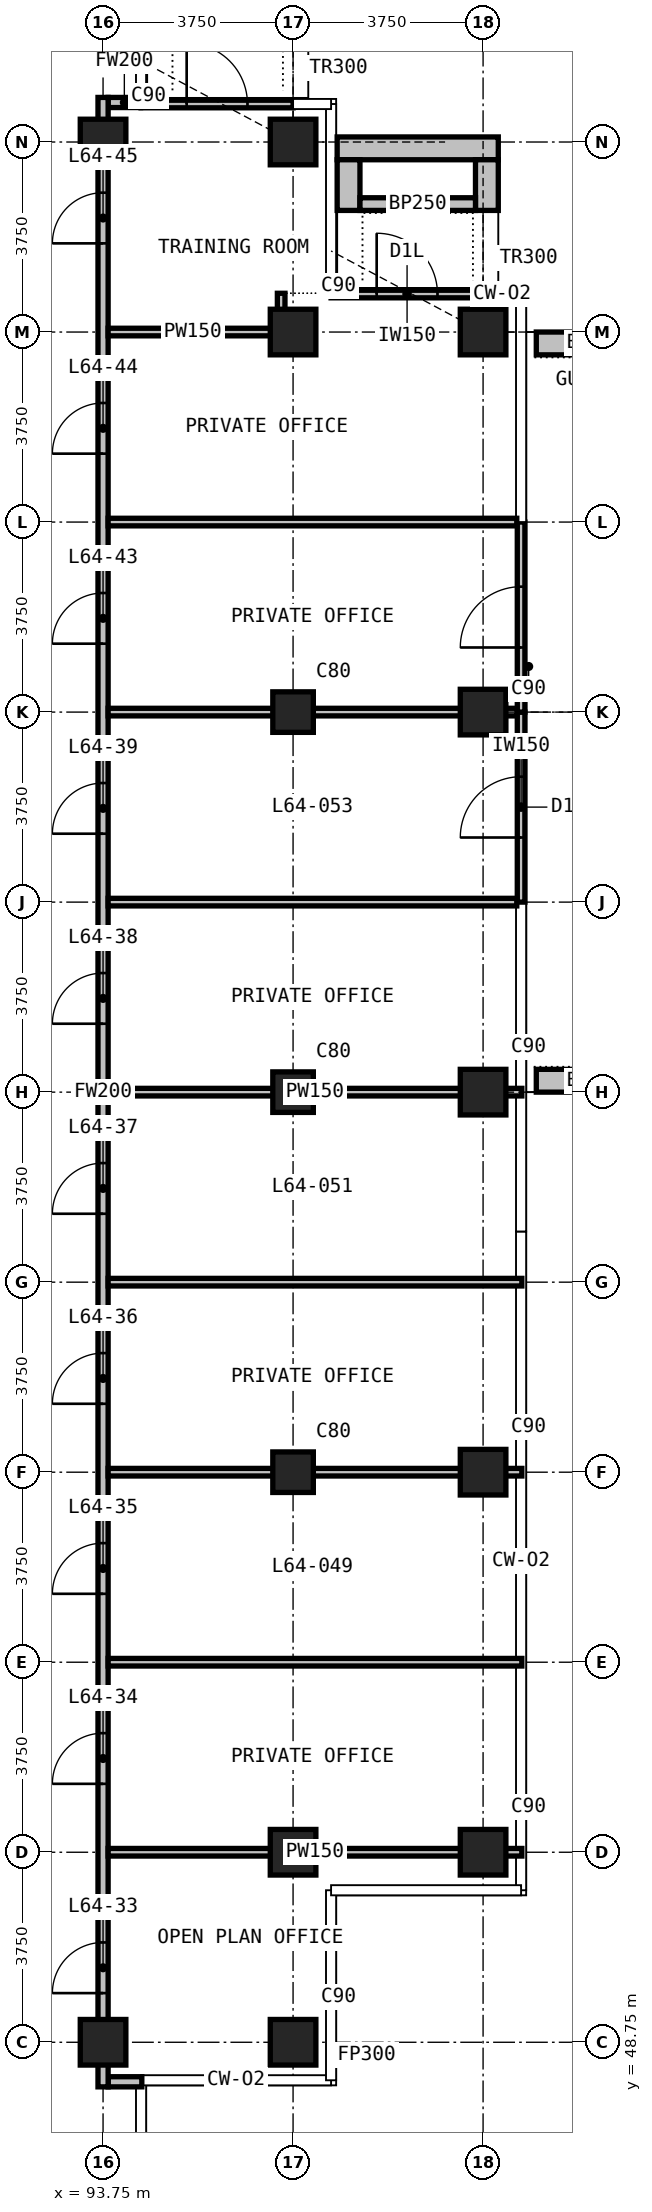
"""IFC4 building model, lengths in metres.
Left out: names, types, materials, properties, quantities, classifications, styles, units other than length and angle.
Written with IfcOpenShell. Run it as: python <this file> out.ifc"""

import sys

from ifc_helpers import new_model, si_unit, direction, frame, frame_2d, origin, origin_2d, place, context, subcontext, project, spatial, rectangle, extrude, element, fill, save


model = new_model("IFC4")
c1 = context("Model", 3, precision=1e-05, world=origin(), true_north=direction((0.0, 1.0)))
c2 = subcontext(c1, "Body", "Model", "MODEL_VIEW")
j1 = project(units=[si_unit("LENGTHUNIT", "METRE"), si_unit("PLANEANGLEUNIT", "RADIAN")], contexts=[c1])
p1 = place(None, origin())
s1 = spatial("IfcSite", under=j1, at=p1, CompositionType="ELEMENT")
p2 = place(p1, origin())
s2 = spatial("IfcBuilding", under=s1, at=p2, CompositionType="ELEMENT")
p3 = place(p2, frame((0.0, 0.0, 246.3)))
s3 = spatial("IfcBuildingStorey", under=s2, at=p3, CompositionType="ELEMENT", Elevation=246.3)
for number, where, z_axis, x_axis in (
    (1, (93.75, 48.75, 0.0), (0.0, 0.0, 1.0), (1.0, 0.0, 0.0)),
    (2, (93.75, 86.25, 0.0), (0.0, 0.0, 1.0), (1.0, 0.0, 0.0)),
    (3, (97.5, 48.75, 0.0), (0.0, 0.0, 1.0), (1.0, 0.0, 0.0)),
    (4, (97.5, 52.5, 0.0), (0.0, 0.0, 1.0), (1.0, 0.0, 0.0)),
):
    element("IfcColumn", number, at=place(p3, frame(where, z_axis=z_axis, x_axis=x_axis)), inside=s3, PredefinedType="COLUMN", context=c2, shape_type="SweptSolid", body=[
        extrude(rectangle(XDim=0.9, YDim=0.9, at=origin_2d()), origin(), (0.0, 0.0, 1.0), 3.6),
    ])
for number, where, z_axis, x_axis in (
    (5, (97.5, 60.0, 0.0), (0.0, 0.0, 1.0), (1.0, 0.0, 0.0)),
    (6, (97.5, 67.5, 0.0), (0.0, 0.0, 1.0), (1.0, 0.0, 0.0)),
    (7, (97.5, 75.0, 0.0), (0.0, 0.0, 1.0), (1.0, 0.0, 0.0)),
):
    element("IfcColumn", number, at=place(p3, frame(where, z_axis=z_axis, x_axis=x_axis)), inside=s3, PredefinedType="COLUMN", context=c2, shape_type="SweptSolid", body=[
        extrude(rectangle(XDim=0.8, YDim=0.8, at=origin_2d()), origin(), (0.0, 0.0, 1.0), 3.6),
    ])
for number, where, z_axis, x_axis in (
    (8, (97.5, 82.5, 0.0), (0.0, 0.0, 1.0), (1.0, 0.0, 0.0)),
    (9, (97.5, 86.25, 0.0), (0.0, 0.0, 1.0), (1.0, 0.0, 0.0)),
    (10, (101.25, 52.5, 0.0), (0.0, 0.0, 1.0), (1.0, 0.0, 0.0)),
    (11, (101.25, 60.0, 0.0), (0.0, 0.0, 1.0), (1.0, 0.0, 0.0)),
    (12, (101.25, 67.5, 0.0), (0.0, 0.0, 1.0), (1.0, 0.0, 0.0)),
    (13, (101.25, 75.0, 0.0), (0.0, 0.0, 1.0), (1.0, 0.0, 0.0)),
    (14, (101.25, 82.5, 0.0), (0.0, 0.0, 1.0), (1.0, 0.0, 0.0)),
):
    element("IfcColumn", number, at=place(p3, frame(where, z_axis=z_axis, x_axis=x_axis)), inside=s3, PredefinedType="COLUMN", context=c2, shape_type="SweptSolid", body=[
        extrude(rectangle(XDim=0.9, YDim=0.9, at=origin_2d()), origin(), (0.0, 0.0, 1.0), 3.6),
    ])
p4 = place(p3, frame((102.0, 71.25, 0.0), z_axis=(0.0, 0.0, 1.0), x_axis=(0.0, 1.0, 0.0)))
e15 = element("IfcWall", 15, at=p4, inside=s3, PredefinedType="SOLIDWALL", context=c2, shape_type="SweptSolid", body=[
    extrude(rectangle(XDim=3.75, YDim=0.15, at=frame_2d((1.875, 0.0))), origin(), (0.0, 0.0, 1.0), 3.3),
])
p5 = place(p4, frame((1.275, 0.0, 0.0)))
e16 = element("IfcOpeningElement", 16, at=p5, cuts=e15, PredefinedType="OPENING", context=c2, shape_type="SweptSolid", body=[
    extrude(rectangle(XDim=1.2, YDim=2.4, at=frame_2d((0.6, 1.2))), frame((0.0, 0.085, 0.0), z_axis=(0.0, -1.0, 0.0), x_axis=(1.0, 0.0, 0.0)), (0.0, 0.0, 1.0), 0.17),
])
p6 = place(p3, frame((102.0, 75.0, 0.0), z_axis=(0.0, 0.0, 1.0), x_axis=(0.0, 1.0, 0.0)))
e17 = element("IfcWall", 17, at=p6, inside=s3, PredefinedType="SOLIDWALL", context=c2, shape_type="SweptSolid", body=[
    extrude(rectangle(XDim=3.75, YDim=0.15, at=frame_2d((1.875, 0.0))), origin(), (0.0, 0.0, 1.0), 3.3),
])
p7 = place(p6, frame((1.275, 0.0, 0.0)))
e18 = element("IfcOpeningElement", 18, at=p7, cuts=e17, PredefinedType="OPENING", context=c2, shape_type="SweptSolid", body=[
    extrude(rectangle(XDim=1.2, YDim=2.4, at=frame_2d((0.6, 1.2))), frame((0.0, 0.085, 0.0), z_axis=(0.0, -1.0, 0.0), x_axis=(1.0, 0.0, 0.0)), (0.0, 0.0, 1.0), 0.17),
])
p8 = place(p3, frame((98.25, 83.25, 0.0), z_axis=(0.0, 0.0, 1.0), x_axis=(1.0, 0.0, 0.0)))
e19 = element("IfcWall", 19, at=p8, inside=s3, PredefinedType="SOLIDWALL", context=c2, shape_type="SweptSolid", body=[
    extrude(rectangle(XDim=3.0, YDim=0.15, at=frame_2d((1.5, 0.0))), origin(), (0.0, 0.0, 1.0), 3.3),
])
p9 = place(p8, frame((0.9, 0.0, 0.0)))
e20 = element("IfcOpeningElement", 20, at=p9, cuts=e19, PredefinedType="OPENING", context=c2, shape_type="SweptSolid", body=[
    extrude(rectangle(XDim=1.2, YDim=2.0, at=frame_2d((0.6, 1.0))), frame((0.0, 0.085, 0.0), z_axis=(0.0, -1.0, 0.0), x_axis=(1.0, 0.0, 0.0)), (0.0, 0.0, 1.0), 0.17),
])
p10 = place(p3, frame((94.5, 87.0, 0.0), z_axis=(0.0, 0.0, 1.0), x_axis=(1.0, 0.0, 0.0)))
e21 = element("IfcWall", 21, at=p10, inside=s3, PredefinedType="SOLIDWALL", context=c2, shape_type="SweptSolid", body=[
    extrude(rectangle(XDim=3.0, YDim=0.15, at=frame_2d((1.5, 0.0))), origin(), (0.0, 0.0, 1.0), 3.3),
])
p11 = place(p10, frame((0.9, 0.0, 0.0)))
e22 = element("IfcOpeningElement", 22, at=p11, cuts=e21, PredefinedType="OPENING", context=c2, shape_type="SweptSolid", body=[
    extrude(rectangle(XDim=1.2, YDim=2.0, at=frame_2d((0.6, 1.0))), frame((0.0, 0.085, 0.0), z_axis=(0.0, -1.0, 0.0), x_axis=(1.0, 0.0, 0.0)), (0.0, 0.0, 1.0), 0.17),
])
for number, where, z_axis, x_axis in (
    (23, (102.3, 67.725, 0.0), (0.0, 0.0, 1.0), (1.0, 0.0, 0.0)),
    (24, (102.3, 82.275, 0.0), (0.0, 0.0, 1.0), (1.0, 0.0, 0.0)),
):
    element("IfcWall", number, at=place(p3, frame(where, z_axis=z_axis, x_axis=x_axis)), inside=s3, PredefinedType="USERDEFINED", context=c2, shape_type="SweptSolid", body=[
        extrude(rectangle(XDim=2.35, YDim=0.45, at=frame_2d((1.175, 0.0))), origin(), (0.0, 0.0, 1.0), 1.1),
    ])
p12 = place(p3, frame((98.37, 86.125, 0.0), z_axis=(0.0, 0.0, 1.0), x_axis=(1.0, 0.0, 0.0)))
e25 = element("IfcWall", 25, at=p12, inside=s3, PredefinedType="USERDEFINED", context=c2, shape_type="SweptSolid", body=[
    extrude(rectangle(XDim=3.18, YDim=0.45, at=frame_2d((1.59, 0.0))), origin(), (0.0, 0.0, 1.0), 1.1),
])
for number, where, z_axis, x_axis in (
    (26, (98.595, 84.9, 0.0), (0.0, 0.0, 1.0), (0.0, 1.0, 0.0)),
    (27, (101.325, 84.9, 0.0), (0.0, 0.0, 1.0), (0.0, 1.0, 0.0)),
):
    element("IfcWall", number, at=place(p3, frame(where, z_axis=z_axis, x_axis=x_axis)), inside=s3, PredefinedType="USERDEFINED", context=c2, shape_type="SweptSolid", body=[
        extrude(rectangle(XDim=1.0, YDim=0.45, at=frame_2d((0.5, 0.0))), origin(), (0.0, 0.0, 1.0), 1.1),
    ])
p13 = place(p3, frame((98.82, 85.025, 0.0), z_axis=(0.0, 0.0, 1.0), x_axis=(1.0, 0.0, 0.0)))
e28 = element("IfcWall", 28, at=p13, inside=s3, PredefinedType="USERDEFINED", context=c2, shape_type="SweptSolid", body=[
    extrude(rectangle(XDim=2.28, YDim=0.25, at=frame_2d((1.14, 0.0))), origin(), (0.0, 0.0, 1.0), 1.0),
])
p14 = place(p3, frame((93.85, 47.97, 0.0), z_axis=(0.0, 0.0, 1.0), x_axis=(1.0, 0.0, 0.0)))
e29 = element("IfcWall", 29, at=p14, inside=s3, PredefinedType="PARTITIONING", context=c2, shape_type="SweptSolid", body=[
    extrude(rectangle(XDim=0.665, YDim=0.2, at=frame_2d((0.333, 0.0))), origin(), (0.0, 0.0, 1.0), 3.3),
])
p15 = place(p3, frame((93.85, 87.03, 0.0), z_axis=(0.0, 0.0, 1.0), x_axis=(1.0, 0.0, 0.0)))
e30 = element("IfcWall", 30, at=p15, inside=s3, PredefinedType="PARTITIONING", context=c2, shape_type="SweptSolid", body=[
    extrude(rectangle(XDim=0.64, YDim=0.2, at=frame_2d((0.32, 0.0))), origin(), (0.0, 0.0, 1.0), 3.3),
])
p16 = place(p3, frame((93.75, 47.87, 0.0), z_axis=(0.0, 0.0, 1.0), x_axis=(0.0, 1.0, 0.0)))
e31 = element("IfcWall", 31, at=p16, inside=s3, PredefinedType="PARTITIONING", context=c2, shape_type="SweptSolid", body=[
    extrude(rectangle(XDim=39.26, YDim=0.2, at=frame_2d((19.63, 0.0))), origin(), (0.0, 0.0, 1.0), 3.3),
])
p17 = place(p16, frame((1.85, 0.0, 0.0)))
e32 = element("IfcOpeningElement", 32, at=p17, cuts=e31, PredefinedType="OPENING", context=c2, shape_type="SweptSolid", body=[
    extrude(rectangle(XDim=1.0, YDim=2.2, at=frame_2d((0.5, 1.1))), frame((0.0, 0.11, 0.0), z_axis=(0.0, -1.0, 0.0), x_axis=(1.0, 0.0, 0.0)), (0.0, 0.0, 1.0), 0.22),
])
p18 = place(p16, frame((5.98, 0.0, 0.0)))
e33 = element("IfcOpeningElement", 33, at=p18, cuts=e31, PredefinedType="OPENING", context=c2, shape_type="SweptSolid", body=[
    extrude(rectangle(XDim=1.0, YDim=2.2, at=frame_2d((0.5, 1.1))), frame((0.0, 0.11, 0.0), z_axis=(0.0, -1.0, 0.0), x_axis=(1.0, 0.0, 0.0)), (0.0, 0.0, 1.0), 0.22),
])
p19 = place(p16, frame((9.73, 0.0, 0.0)))
e34 = element("IfcOpeningElement", 34, at=p19, cuts=e31, PredefinedType="OPENING", context=c2, shape_type="SweptSolid", body=[
    extrude(rectangle(XDim=1.0, YDim=2.2, at=frame_2d((0.5, 1.1))), frame((0.0, 0.11, 0.0), z_axis=(0.0, -1.0, 0.0), x_axis=(1.0, 0.0, 0.0)), (0.0, 0.0, 1.0), 0.22),
])
p20 = place(p16, frame((13.48, 0.0, 0.0)))
e35 = element("IfcOpeningElement", 35, at=p20, cuts=e31, PredefinedType="OPENING", context=c2, shape_type="SweptSolid", body=[
    extrude(rectangle(XDim=1.0, YDim=2.2, at=frame_2d((0.5, 1.1))), frame((0.0, 0.11, 0.0), z_axis=(0.0, -1.0, 0.0), x_axis=(1.0, 0.0, 0.0)), (0.0, 0.0, 1.0), 0.22),
])
p21 = place(p16, frame((17.23, 0.0, 0.0)))
e36 = element("IfcOpeningElement", 36, at=p21, cuts=e31, PredefinedType="OPENING", context=c2, shape_type="SweptSolid", body=[
    extrude(rectangle(XDim=1.0, YDim=2.2, at=frame_2d((0.5, 1.1))), frame((0.0, 0.11, 0.0), z_axis=(0.0, -1.0, 0.0), x_axis=(1.0, 0.0, 0.0)), (0.0, 0.0, 1.0), 0.22),
])
p22 = place(p16, frame((20.98, 0.0, 0.0)))
e37 = element("IfcOpeningElement", 37, at=p22, cuts=e31, PredefinedType="OPENING", context=c2, shape_type="SweptSolid", body=[
    extrude(rectangle(XDim=1.0, YDim=2.2, at=frame_2d((0.5, 1.1))), frame((0.0, 0.11, 0.0), z_axis=(0.0, -1.0, 0.0), x_axis=(1.0, 0.0, 0.0)), (0.0, 0.0, 1.0), 0.22),
])
p23 = place(p16, frame((24.73, 0.0, 0.0)))
e38 = element("IfcOpeningElement", 38, at=p23, cuts=e31, PredefinedType="OPENING", context=c2, shape_type="SweptSolid", body=[
    extrude(rectangle(XDim=1.0, YDim=2.2, at=frame_2d((0.5, 1.1))), frame((0.0, 0.11, 0.0), z_axis=(0.0, -1.0, 0.0), x_axis=(1.0, 0.0, 0.0)), (0.0, 0.0, 1.0), 0.22),
])
p24 = place(p16, frame((28.48, 0.0, 0.0)))
e39 = element("IfcOpeningElement", 39, at=p24, cuts=e31, PredefinedType="OPENING", context=c2, shape_type="SweptSolid", body=[
    extrude(rectangle(XDim=1.0, YDim=2.2, at=frame_2d((0.5, 1.1))), frame((0.0, 0.11, 0.0), z_axis=(0.0, -1.0, 0.0), x_axis=(1.0, 0.0, 0.0)), (0.0, 0.0, 1.0), 0.22),
])
p25 = place(p16, frame((32.23, 0.0, 0.0)))
e40 = element("IfcOpeningElement", 40, at=p25, cuts=e31, PredefinedType="OPENING", context=c2, shape_type="SweptSolid", body=[
    extrude(rectangle(XDim=1.0, YDim=2.2, at=frame_2d((0.5, 1.1))), frame((0.0, 0.11, 0.0), z_axis=(0.0, -1.0, 0.0), x_axis=(1.0, 0.0, 0.0)), (0.0, 0.0, 1.0), 0.22),
])
p26 = place(p16, frame((36.38, 0.0, 0.0)))
e41 = element("IfcOpeningElement", 41, at=p26, cuts=e31, PredefinedType="OPENING", context=c2, shape_type="SweptSolid", body=[
    extrude(rectangle(XDim=1.0, YDim=2.2, at=frame_2d((0.5, 1.1))), frame((0.0, 0.11, 0.0), z_axis=(0.0, -1.0, 0.0), x_axis=(1.0, 0.0, 0.0)), (0.0, 0.0, 1.0), 0.22),
])
for number, where, z_axis, x_axis in (
    (42, (93.85, 52.5, 0.0), (0.0, 0.0, 1.0), (1.0, 0.0, 0.0)),
    (43, (93.85, 56.25, 0.0), (0.0, 0.0, 1.0), (1.0, 0.0, 0.0)),
    (44, (93.85, 60.0, 0.0), (0.0, 0.0, 1.0), (1.0, 0.0, 0.0)),
    (45, (93.85, 63.75, 0.0), (0.0, 0.0, 1.0), (1.0, 0.0, 0.0)),
    (46, (93.85, 67.5, 0.0), (0.0, 0.0, 1.0), (1.0, 0.0, 0.0)),
):
    element("IfcWall", number, at=place(p3, frame(where, z_axis=z_axis, x_axis=x_axis)), inside=s3, PredefinedType="PARTITIONING", context=c2, shape_type="SweptSolid", body=[
        extrude(rectangle(XDim=8.165, YDim=0.15, at=frame_2d((4.083, 0.0))), origin(), (0.0, 0.0, 1.0), 3.3),
    ])
for number, where, z_axis, x_axis in (
    (47, (93.85, 71.25, 0.0), (0.0, 0.0, 1.0), (1.0, 0.0, 0.0)),
    (48, (93.85, 75.0, 0.0), (0.0, 0.0, 1.0), (1.0, 0.0, 0.0)),
    (49, (93.85, 78.75, 0.0), (0.0, 0.0, 1.0), (1.0, 0.0, 0.0)),
):
    element("IfcWall", number, at=place(p3, frame(where, z_axis=z_axis, x_axis=x_axis)), inside=s3, PredefinedType="PARTITIONING", context=c2, shape_type="SweptSolid", body=[
        extrude(rectangle(XDim=8.065, YDim=0.15, at=frame_2d((4.032, 0.0))), origin(), (0.0, 0.0, 1.0), 3.3),
    ])
p27 = place(p3, frame((93.85, 82.5, 0.0), z_axis=(0.0, 0.0, 1.0), x_axis=(1.0, 0.0, 0.0)))
e50 = element("IfcWall", 50, at=p27, inside=s3, PredefinedType="PARTITIONING", context=c2, shape_type="SweptSolid", body=[
    extrude(rectangle(XDim=3.34, YDim=0.15, at=frame_2d((1.67, 0.0))), origin(), (0.0, 0.0, 1.0), 3.3),
])
p28 = place(p3, frame((97.265, 82.425, 0.0), z_axis=(0.0, 0.0, 1.0), x_axis=(0.0, 1.0, 0.0)))
e51 = element("IfcWall", 51, at=p28, inside=s3, PredefinedType="PARTITIONING", context=c2, shape_type="SweptSolid", body=[
    extrude(rectangle(XDim=0.84, YDim=0.15, at=frame_2d((0.42, 0.0))), origin(), (0.0, 0.0, 1.0), 3.3),
])
p29 = place(p5, origin())
e52 = element("IfcDoor", 52, at=p29, inside=s3, OperationType="SINGLE_SWING_LEFT", PredefinedType="DOOR", context=c2, shape_type="SweptSolid", body=[
    extrude(rectangle(XDim=1.2, YDim=2.4, at=frame_2d((0.6, 1.2))), frame((0.0, 0.025, 0.0), z_axis=(0.0, -1.0, 0.0), x_axis=(1.0, 0.0, 0.0)), (0.0, 0.0, 1.0), 0.05),
])
fill(e16, e52)
p30 = place(p7, origin())
e53 = element("IfcDoor", 53, at=p30, inside=s3, OperationType="SINGLE_SWING_LEFT", PredefinedType="DOOR", context=c2, shape_type="SweptSolid", body=[
    extrude(rectangle(XDim=1.2, YDim=2.4, at=frame_2d((0.6, 1.2))), frame((0.0, 0.025, 0.0), z_axis=(0.0, -1.0, 0.0), x_axis=(1.0, 0.0, 0.0)), (0.0, 0.0, 1.0), 0.05),
])
fill(e18, e53)
p31 = place(p9, origin())
e54 = element("IfcDoor", 54, at=p31, inside=s3, OperationType="SINGLE_SWING_LEFT", PredefinedType="DOOR", context=c2, shape_type="SweptSolid", body=[
    extrude(rectangle(XDim=1.2, YDim=2.0, at=frame_2d((0.6, 1.0))), frame((0.0, 0.025, 0.0), z_axis=(0.0, -1.0, 0.0), x_axis=(1.0, 0.0, 0.0)), (0.0, 0.0, 1.0), 0.05),
])
fill(e20, e54)
p32 = place(p11, origin())
e55 = element("IfcDoor", 55, at=p32, inside=s3, OperationType="SINGLE_SWING_LEFT", PredefinedType="DOOR", context=c2, shape_type="SweptSolid", body=[
    extrude(rectangle(XDim=1.2, YDim=2.0, at=frame_2d((0.6, 1.0))), frame((0.0, 0.025, 0.0), z_axis=(0.0, -1.0, 0.0), x_axis=(1.0, 0.0, 0.0)), (0.0, 0.0, 1.0), 0.05),
])
fill(e22, e55)
p33 = place(p17, origin())
e56 = element("IfcDoor", 56, at=p33, inside=s3, OperationType="SINGLE_SWING_LEFT", PredefinedType="DOOR", context=c2, shape_type="SweptSolid", body=[
    extrude(rectangle(XDim=1.0, YDim=2.2, at=frame_2d((0.5, 1.1))), frame((0.0, 0.025, 0.0), z_axis=(0.0, -1.0, 0.0), x_axis=(1.0, 0.0, 0.0)), (0.0, 0.0, 1.0), 0.05),
])
fill(e32, e56)
p34 = place(p18, origin())
e57 = element("IfcDoor", 57, at=p34, inside=s3, OperationType="SINGLE_SWING_RIGHT", PredefinedType="DOOR", context=c2, shape_type="SweptSolid", body=[
    extrude(rectangle(XDim=1.0, YDim=2.2, at=frame_2d((0.5, 1.1))), frame((0.0, 0.025, 0.0), z_axis=(0.0, -1.0, 0.0), x_axis=(1.0, 0.0, 0.0)), (0.0, 0.0, 1.0), 0.05),
])
fill(e33, e57)
p35 = place(p19, origin())
e58 = element("IfcDoor", 58, at=p35, inside=s3, OperationType="SINGLE_SWING_LEFT", PredefinedType="DOOR", context=c2, shape_type="SweptSolid", body=[
    extrude(rectangle(XDim=1.0, YDim=2.2, at=frame_2d((0.5, 1.1))), frame((0.0, 0.025, 0.0), z_axis=(0.0, -1.0, 0.0), x_axis=(1.0, 0.0, 0.0)), (0.0, 0.0, 1.0), 0.05),
])
fill(e34, e58)
p36 = place(p20, origin())
e59 = element("IfcDoor", 59, at=p36, inside=s3, OperationType="SINGLE_SWING_LEFT", PredefinedType="DOOR", context=c2, shape_type="SweptSolid", body=[
    extrude(rectangle(XDim=1.0, YDim=2.2, at=frame_2d((0.5, 1.1))), frame((0.0, 0.025, 0.0), z_axis=(0.0, -1.0, 0.0), x_axis=(1.0, 0.0, 0.0)), (0.0, 0.0, 1.0), 0.05),
])
fill(e35, e59)
p37 = place(p21, origin())
e60 = element("IfcDoor", 60, at=p37, inside=s3, OperationType="SINGLE_SWING_LEFT", PredefinedType="DOOR", context=c2, shape_type="SweptSolid", body=[
    extrude(rectangle(XDim=1.0, YDim=2.2, at=frame_2d((0.5, 1.1))), frame((0.0, 0.025, 0.0), z_axis=(0.0, -1.0, 0.0), x_axis=(1.0, 0.0, 0.0)), (0.0, 0.0, 1.0), 0.05),
])
fill(e36, e60)
p38 = place(p22, origin())
e61 = element("IfcDoor", 61, at=p38, inside=s3, OperationType="SINGLE_SWING_LEFT", PredefinedType="DOOR", context=c2, shape_type="SweptSolid", body=[
    extrude(rectangle(XDim=1.0, YDim=2.2, at=frame_2d((0.5, 1.1))), frame((0.0, 0.025, 0.0), z_axis=(0.0, -1.0, 0.0), x_axis=(1.0, 0.0, 0.0)), (0.0, 0.0, 1.0), 0.05),
])
fill(e37, e61)
p39 = place(p23, origin())
e62 = element("IfcDoor", 62, at=p39, inside=s3, OperationType="SINGLE_SWING_LEFT", PredefinedType="DOOR", context=c2, shape_type="SweptSolid", body=[
    extrude(rectangle(XDim=1.0, YDim=2.2, at=frame_2d((0.5, 1.1))), frame((0.0, 0.025, 0.0), z_axis=(0.0, -1.0, 0.0), x_axis=(1.0, 0.0, 0.0)), (0.0, 0.0, 1.0), 0.05),
])
fill(e38, e62)
p40 = place(p24, origin())
e63 = element("IfcDoor", 63, at=p40, inside=s3, OperationType="SINGLE_SWING_LEFT", PredefinedType="DOOR", context=c2, shape_type="SweptSolid", body=[
    extrude(rectangle(XDim=1.0, YDim=2.2, at=frame_2d((0.5, 1.1))), frame((0.0, 0.025, 0.0), z_axis=(0.0, -1.0, 0.0), x_axis=(1.0, 0.0, 0.0)), (0.0, 0.0, 1.0), 0.05),
])
fill(e39, e63)
p41 = place(p25, origin())
e64 = element("IfcDoor", 64, at=p41, inside=s3, OperationType="SINGLE_SWING_LEFT", PredefinedType="DOOR", context=c2, shape_type="SweptSolid", body=[
    extrude(rectangle(XDim=1.0, YDim=2.2, at=frame_2d((0.5, 1.1))), frame((0.0, 0.025, 0.0), z_axis=(0.0, -1.0, 0.0), x_axis=(1.0, 0.0, 0.0)), (0.0, 0.0, 1.0), 0.05),
])
fill(e40, e64)
p42 = place(p26, origin())
e65 = element("IfcDoor", 65, at=p42, inside=s3, OperationType="SINGLE_SWING_LEFT", PredefinedType="DOOR", context=c2, shape_type="SweptSolid", body=[
    extrude(rectangle(XDim=1.0, YDim=2.2, at=frame_2d((0.5, 1.1))), frame((0.0, 0.025, 0.0), z_axis=(0.0, -1.0, 0.0), x_axis=(1.0, 0.0, 0.0)), (0.0, 0.0, 1.0), 0.05),
])
fill(e41, e65)
save(model, sys.argv[1])
